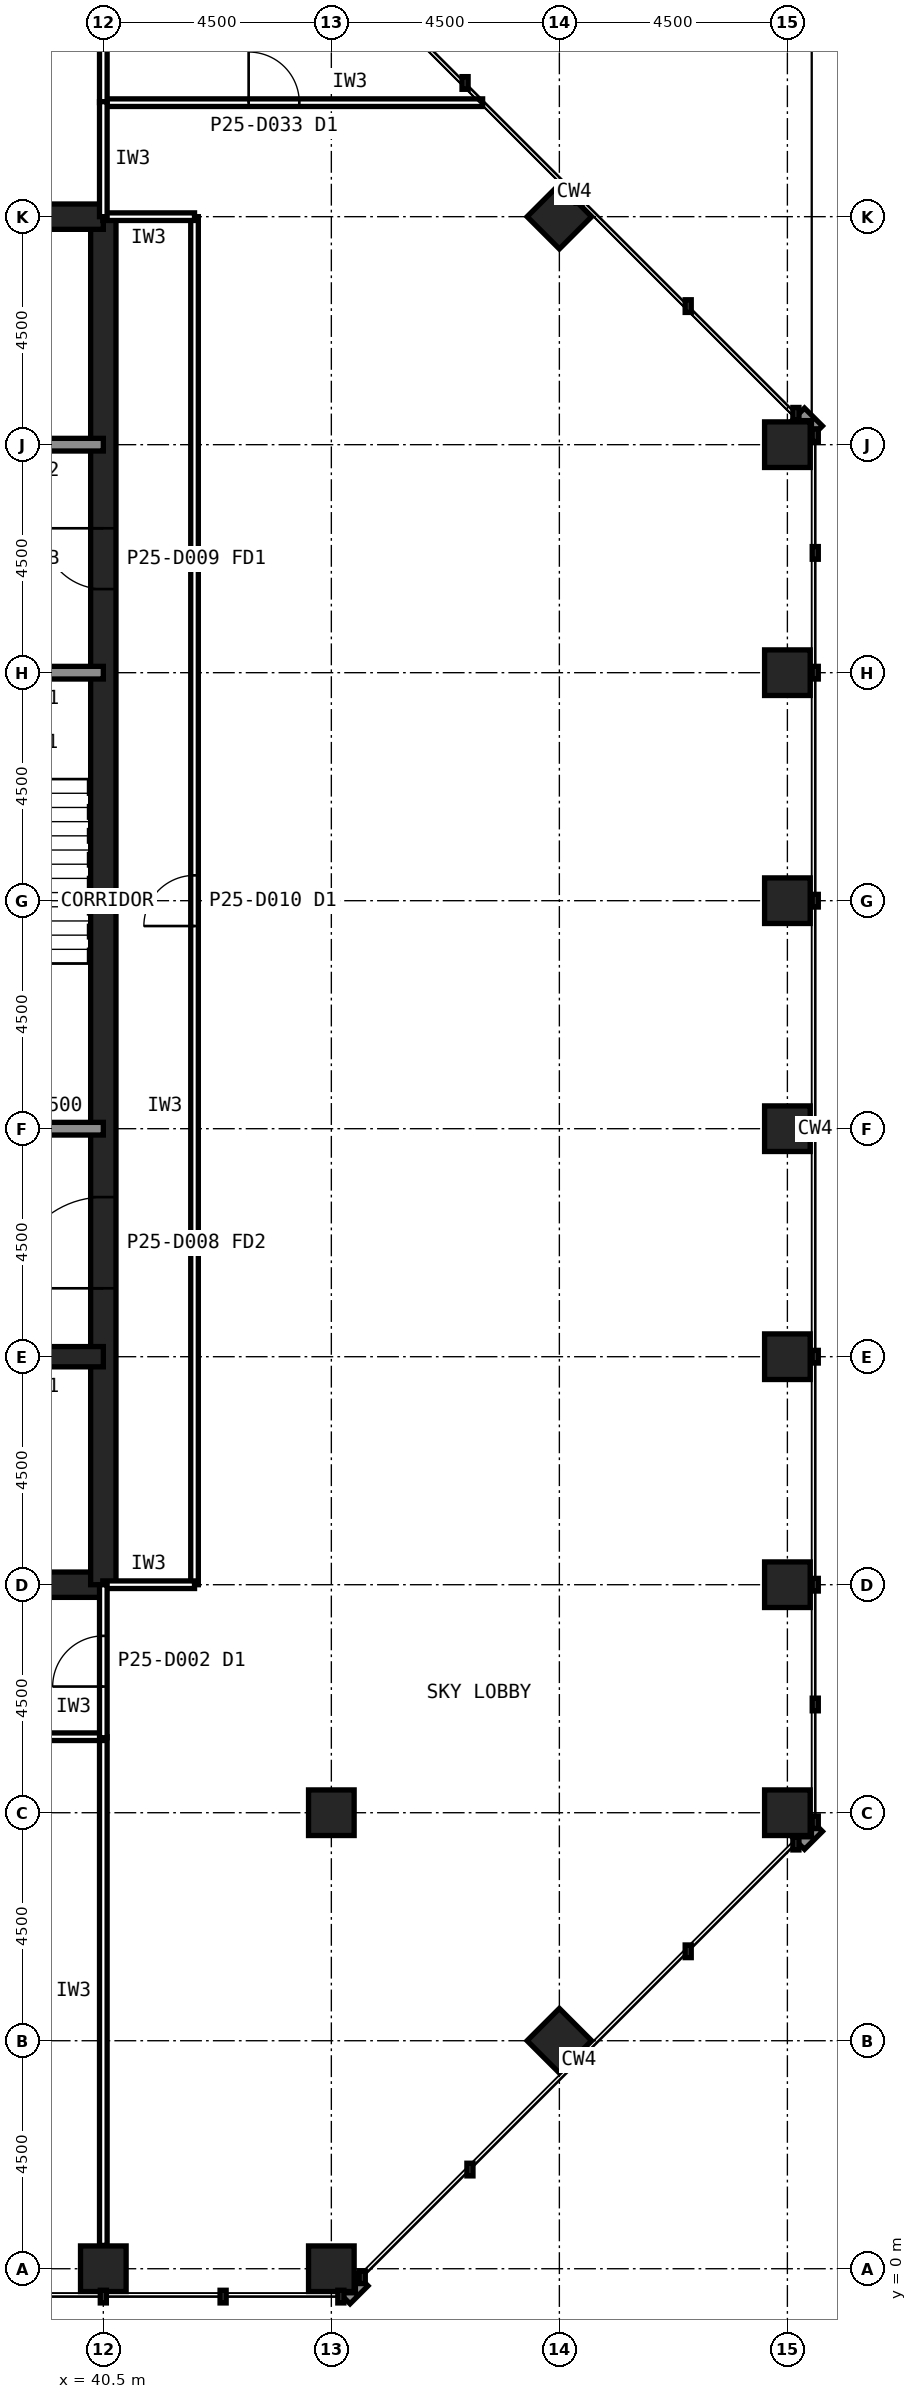
"""IFC4 building model, lengths in metres.
Left out: names, types, materials, properties, quantities, classifications, styles, units other than length and angle.
Written with IfcOpenShell. Run it as: python <this file> out.ifc"""

import sys

from ifc_helpers import new_model, si_unit, direction, frame, frame_2d, origin, origin_2d, place, context, subcontext, project, spatial, rectangle, hollow_rectangle, extrude, element, fill, save


model = new_model("IFC4")
c1 = context("Model", 3, precision=1e-05, world=origin(), true_north=direction((0.0, 1.0)))
c2 = subcontext(c1, "Body", "Model", "MODEL_VIEW")
j1 = project(units=[si_unit("LENGTHUNIT", "METRE"), si_unit("PLANEANGLEUNIT", "RADIAN")], contexts=[c1])
p1 = place(None, origin())
s1 = spatial("IfcSite", under=j1, at=p1, CompositionType="ELEMENT")
p2 = place(p1, origin())
s2 = spatial("IfcBuilding", under=s1, at=p2, CompositionType="ELEMENT")
p3 = place(p2, frame((0.0, 0.0, 110.6)))
s3 = spatial("IfcBuildingStorey", under=s2, at=p3, CompositionType="ELEMENT", Elevation=110.6)
for number, where, z_axis, x_axis in (
    (1, (40.5, 0.0, 0.0), (0.0, 0.0, 1.0), (1.0, 0.0, 0.0)),
    (2, (45.0, 0.0, 0.0), (0.0, 0.0, 1.0), (1.0, 0.0, 0.0)),
    (3, (54.0, 9.0, 0.0), (0.0, 0.0, 1.0), (1.0, 0.0, 0.0)),
    (4, (54.0, 13.5, 0.0), (0.0, 0.0, 1.0), (1.0, 0.0, 0.0)),
    (5, (54.0, 18.0, 0.0), (0.0, 0.0, 1.0), (1.0, 0.0, 0.0)),
    (6, (54.0, 22.5, 0.0), (0.0, 0.0, 1.0), (1.0, 0.0, 0.0)),
    (7, (54.0, 27.0, 0.0), (0.0, 0.0, 1.0), (1.0, 0.0, 0.0)),
    (8, (54.0, 31.5, 0.0), (0.0, 0.0, 1.0), (1.0, 0.0, 0.0)),
    (9, (54.0, 36.0, 0.0), (0.0, 0.0, 1.0), (1.0, 0.0, 0.0)),
    (10, (49.5, 4.5, 0.0), (0.0, 0.0, 1.0), (0.707, 0.707, 0.0)),
    (11, (49.5, 40.5, 0.0), (0.0, 0.0, 1.0), (0.707, 0.707, 0.0)),
    (12, (45.0, 9.0, 0.0), (0.0, 0.0, 1.0), (1.0, 0.0, 0.0)),
):
    element("IfcColumn", number, at=place(p3, frame(where, z_axis=z_axis, x_axis=x_axis)), inside=s3, PredefinedType="COLUMN", context=c2, shape_type="SweptSolid", body=[
        extrude(hollow_rectangle(XDim=0.9, YDim=0.9, WallThickness=0.063, at=origin_2d()), origin(), (0.0, 0.0, 1.0), 5.0),
    ])
p4 = place(p3, frame((13.5, 13.5, 0.0), z_axis=(0.0, 0.0, 1.0), x_axis=(1.0, 0.0, 0.0)))
e13 = element("IfcWall", 13, at=p4, inside=s3, PredefinedType="SHEAR", context=c2, shape_type="SweptSolid", body=[
    extrude(rectangle(XDim=27.0, YDim=0.5, at=frame_2d((13.5, 0.0))), origin(), (0.0, 0.0, 1.0), 5.0),
])
p5 = place(p3, frame((40.5, 13.5, 0.0), z_axis=(0.0, 0.0, 1.0), x_axis=(0.0, 1.0, 0.0)))
e14 = element("IfcWall", 14, at=p5, inside=s3, PredefinedType="SHEAR", context=c2, shape_type="SweptSolid", body=[
    extrude(rectangle(XDim=27.0, YDim=0.5, at=frame_2d((13.5, 0.0))), origin(), (0.0, 0.0, 1.0), 5.0),
])
p6 = place(p5, frame((5.85, 0.0, 0.0)))
e15 = element("IfcOpeningElement", 15, at=p6, cuts=e14, PredefinedType="OPENING", context=c2, shape_type="SweptSolid", body=[
    extrude(rectangle(XDim=1.8, YDim=2.1, at=frame_2d((0.9, 1.05))), frame((0.0, 0.26, 0.0), z_axis=(0.0, -1.0, 0.0), x_axis=(1.0, 0.0, 0.0)), (0.0, 0.0, 1.0), 0.52),
])
p7 = place(p5, frame((19.65, 0.0, 0.0)))
e16 = element("IfcOpeningElement", 16, at=p7, cuts=e14, PredefinedType="OPENING", context=c2, shape_type="SweptSolid", body=[
    extrude(rectangle(XDim=1.2, YDim=2.1, at=frame_2d((0.6, 1.05))), frame((0.0, 0.26, 0.0), z_axis=(0.0, -1.0, 0.0), x_axis=(1.0, 0.0, 0.0)), (0.0, 0.0, 1.0), 0.52),
])
p8 = place(p3, frame((40.5, 40.5, 0.0), z_axis=(0.0, 0.0, 1.0), x_axis=(-1.0, 0.0, 0.0)))
e17 = element("IfcWall", 17, at=p8, inside=s3, PredefinedType="SHEAR", context=c2, shape_type="SweptSolid", body=[
    extrude(rectangle(XDim=27.0, YDim=0.5, at=frame_2d((13.5, 0.0))), origin(), (0.0, 0.0, 1.0), 5.0),
])
p9 = place(p3, frame((13.5, 18.0, 0.0), z_axis=(0.0, 0.0, 1.0), x_axis=(1.0, 0.0, 0.0)))
e18 = element("IfcWall", 18, at=p9, inside=s3, PredefinedType="SHEAR", context=c2, shape_type="SweptSolid", body=[
    extrude(rectangle(XDim=27.0, YDim=0.4, at=frame_2d((13.5, 0.0))), origin(), (0.0, 0.0, 1.0), 5.0),
])
p10 = place(p9, frame((24.3, 0.0, 0.0)))
e19 = element("IfcOpeningElement", 19, at=p10, cuts=e18, PredefinedType="OPENING", context=c2, shape_type="SweptSolid", body=[
    extrude(rectangle(XDim=0.9, YDim=2.1, at=frame_2d((0.45, 1.05))), frame((0.0, 0.21, 0.0), z_axis=(0.0, -1.0, 0.0), x_axis=(1.0, 0.0, 0.0)), (0.0, 0.0, 1.0), 0.42),
])
p11 = place(p9, frame((5.45, 0.0, 0.0)))
e20 = element("IfcOpeningElement", 20, at=p11, cuts=e18, PredefinedType="OPENING", context=c2, shape_type="SweptSolid", body=[
    extrude(rectangle(XDim=1.1, YDim=2.1, at=frame_2d((0.55, 1.05))), frame((0.0, 0.21, 0.0), z_axis=(0.0, -1.0, 0.0), x_axis=(1.0, 0.0, 0.0)), (0.0, 0.0, 1.0), 0.42),
])
p12 = place(p9, frame((8.45, 0.0, 0.0)))
e21 = element("IfcOpeningElement", 21, at=p12, cuts=e18, PredefinedType="OPENING", context=c2, shape_type="SweptSolid", body=[
    extrude(rectangle(XDim=1.1, YDim=2.1, at=frame_2d((0.55, 1.05))), frame((0.0, 0.21, 0.0), z_axis=(0.0, -1.0, 0.0), x_axis=(1.0, 0.0, 0.0)), (0.0, 0.0, 1.0), 0.42),
])
p13 = place(p9, frame((11.45, 0.0, 0.0)))
e22 = element("IfcOpeningElement", 22, at=p13, cuts=e18, PredefinedType="OPENING", context=c2, shape_type="SweptSolid", body=[
    extrude(rectangle(XDim=1.1, YDim=2.1, at=frame_2d((0.55, 1.05))), frame((0.0, 0.21, 0.0), z_axis=(0.0, -1.0, 0.0), x_axis=(1.0, 0.0, 0.0)), (0.0, 0.0, 1.0), 0.42),
])
p14 = place(p9, frame((14.45, 0.0, 0.0)))
e23 = element("IfcOpeningElement", 23, at=p14, cuts=e18, PredefinedType="OPENING", context=c2, shape_type="SweptSolid", body=[
    extrude(rectangle(XDim=1.1, YDim=2.1, at=frame_2d((0.55, 1.05))), frame((0.0, 0.21, 0.0), z_axis=(0.0, -1.0, 0.0), x_axis=(1.0, 0.0, 0.0)), (0.0, 0.0, 1.0), 0.42),
])
p15 = place(p9, frame((17.45, 0.0, 0.0)))
e24 = element("IfcOpeningElement", 24, at=p15, cuts=e18, PredefinedType="OPENING", context=c2, shape_type="SweptSolid", body=[
    extrude(rectangle(XDim=1.1, YDim=2.1, at=frame_2d((0.55, 1.05))), frame((0.0, 0.21, 0.0), z_axis=(0.0, -1.0, 0.0), x_axis=(1.0, 0.0, 0.0)), (0.0, 0.0, 1.0), 0.42),
])
p16 = place(p9, frame((20.45, 0.0, 0.0)))
e25 = element("IfcOpeningElement", 25, at=p16, cuts=e18, PredefinedType="OPENING", context=c2, shape_type="SweptSolid", body=[
    extrude(rectangle(XDim=1.1, YDim=2.1, at=frame_2d((0.55, 1.05))), frame((0.0, 0.21, 0.0), z_axis=(0.0, -1.0, 0.0), x_axis=(1.0, 0.0, 0.0)), (0.0, 0.0, 1.0), 0.42),
])
p17 = place(p9, frame((1.6, 0.0, 0.0)))
e26 = element("IfcOpeningElement", 26, at=p17, cuts=e18, PredefinedType="OPENING", context=c2, shape_type="SweptSolid", body=[
    extrude(rectangle(XDim=1.3, YDim=2.2, at=frame_2d((0.65, 1.1))), frame((0.0, 0.21, 0.0), z_axis=(0.0, -1.0, 0.0), x_axis=(1.0, 0.0, 0.0)), (0.0, 0.0, 1.0), 0.42),
])
p18 = place(p3, frame((13.5, 36.0, 0.0), z_axis=(0.0, 0.0, 1.0), x_axis=(1.0, 0.0, 0.0)))
e27 = element("IfcWall", 27, at=p18, inside=s3, PredefinedType="SOLIDWALL", context=c2, shape_type="SweptSolid", body=[
    extrude(rectangle(XDim=27.0, YDim=0.25, at=frame_2d((13.5, 0.0))), origin(), (0.0, 0.0, 1.0), 4.84),
])
p19 = place(p18, frame((1.8, 0.0, 0.0)))
e28 = element("IfcOpeningElement", 28, at=p19, cuts=e27, PredefinedType="OPENING", context=c2, shape_type="SweptSolid", body=[
    extrude(rectangle(XDim=0.9, YDim=2.1, at=frame_2d((0.45, 1.05))), frame((0.0, 0.135, 0.0), z_axis=(0.0, -1.0, 0.0), x_axis=(1.0, 0.0, 0.0)), (0.0, 0.0, 1.0), 0.27),
])
p20 = place(p18, frame((5.35, 0.0, 0.0)))
e29 = element("IfcOpeningElement", 29, at=p20, cuts=e27, PredefinedType="OPENING", context=c2, shape_type="SweptSolid", body=[
    extrude(rectangle(XDim=1.3, YDim=2.2, at=frame_2d((0.65, 1.1))), frame((0.0, 0.135, 0.0), z_axis=(0.0, -1.0, 0.0), x_axis=(1.0, 0.0, 0.0)), (0.0, 0.0, 1.0), 0.27),
])
p21 = place(p18, frame((8.35, 0.0, 0.0)))
e30 = element("IfcOpeningElement", 30, at=p21, cuts=e27, PredefinedType="OPENING", context=c2, shape_type="SweptSolid", body=[
    extrude(rectangle(XDim=1.3, YDim=2.2, at=frame_2d((0.65, 1.1))), frame((0.0, 0.135, 0.0), z_axis=(0.0, -1.0, 0.0), x_axis=(1.0, 0.0, 0.0)), (0.0, 0.0, 1.0), 0.27),
])
p22 = place(p18, frame((11.35, 0.0, 0.0)))
e31 = element("IfcOpeningElement", 31, at=p22, cuts=e27, PredefinedType="OPENING", context=c2, shape_type="SweptSolid", body=[
    extrude(rectangle(XDim=1.3, YDim=2.2, at=frame_2d((0.65, 1.1))), frame((0.0, 0.135, 0.0), z_axis=(0.0, -1.0, 0.0), x_axis=(1.0, 0.0, 0.0)), (0.0, 0.0, 1.0), 0.27),
])
p23 = place(p18, frame((24.1, 0.0, 0.0)))
e32 = element("IfcOpeningElement", 32, at=p23, cuts=e27, PredefinedType="OPENING", context=c2, shape_type="SweptSolid", body=[
    extrude(rectangle(XDim=1.3, YDim=2.2, at=frame_2d((0.65, 1.1))), frame((0.0, 0.135, 0.0), z_axis=(0.0, -1.0, 0.0), x_axis=(1.0, 0.0, 0.0)), (0.0, 0.0, 1.0), 0.27),
])
p24 = place(p3, frame((13.5, 22.5, 0.0), z_axis=(0.0, 0.0, 1.0), x_axis=(1.0, 0.0, 0.0)))
e33 = element("IfcWall", 33, at=p24, inside=s3, PredefinedType="SOLIDWALL", context=c2, shape_type="SweptSolid", body=[
    extrude(rectangle(XDim=27.0, YDim=0.25, at=frame_2d((13.5, 0.0))), origin(), (0.0, 0.0, 1.0), 4.84),
])
p25 = place(p24, frame((1.65, 0.0, 0.0)))
e34 = element("IfcOpeningElement", 34, at=p25, cuts=e33, PredefinedType="OPENING", context=c2, shape_type="SweptSolid", body=[
    extrude(rectangle(XDim=1.2, YDim=2.1, at=frame_2d((0.6, 1.05))), frame((0.0, 0.135, 0.0), z_axis=(0.0, -1.0, 0.0), x_axis=(1.0, 0.0, 0.0)), (0.0, 0.0, 1.0), 0.27),
])
p26 = place(p24, frame((6.025, 0.0, 0.0)))
e35 = element("IfcOpeningElement", 35, at=p26, cuts=e33, PredefinedType="OPENING", context=c2, shape_type="SweptSolid", body=[
    extrude(rectangle(XDim=1.0, YDim=2.1, at=frame_2d((0.5, 1.05))), frame((0.0, 0.135, 0.0), z_axis=(0.0, -1.0, 0.0), x_axis=(1.0, 0.0, 0.0)), (0.0, 0.0, 1.0), 0.27),
])
p27 = place(p24, frame((10.525, 0.0, 0.0)))
e36 = element("IfcOpeningElement", 36, at=p27, cuts=e33, PredefinedType="OPENING", context=c2, shape_type="SweptSolid", body=[
    extrude(rectangle(XDim=1.0, YDim=2.1, at=frame_2d((0.5, 1.05))), frame((0.0, 0.135, 0.0), z_axis=(0.0, -1.0, 0.0), x_axis=(1.0, 0.0, 0.0)), (0.0, 0.0, 1.0), 0.27),
])
p28 = place(p24, frame((19.75, 0.0, 0.0)))
e37 = element("IfcOpeningElement", 37, at=p28, cuts=e33, PredefinedType="OPENING", context=c2, shape_type="SweptSolid", body=[
    extrude(rectangle(XDim=1.0, YDim=2.1, at=frame_2d((0.5, 1.05))), frame((0.0, 0.135, 0.0), z_axis=(0.0, -1.0, 0.0), x_axis=(1.0, 0.0, 0.0)), (0.0, 0.0, 1.0), 0.27),
])
p29 = place(p24, frame((15.05, 0.0, 0.0)))
e38 = element("IfcOpeningElement", 38, at=p29, cuts=e33, PredefinedType="OPENING", context=c2, shape_type="SweptSolid", body=[
    extrude(rectangle(XDim=1.4, YDim=2.4, at=frame_2d((0.7, 1.2))), frame((0.0, 0.135, 0.0), z_axis=(0.0, -1.0, 0.0), x_axis=(1.0, 0.0, 0.0)), (0.0, 0.0, 1.0), 0.27),
])
p30 = place(p3, frame((13.5, 31.5, 0.0), z_axis=(0.0, 0.0, 1.0), x_axis=(1.0, 0.0, 0.0)))
e39 = element("IfcWall", 39, at=p30, inside=s3, PredefinedType="SOLIDWALL", context=c2, shape_type="SweptSolid", body=[
    extrude(rectangle(XDim=27.0, YDim=0.25, at=frame_2d((13.5, 0.0))), origin(), (0.0, 0.0, 1.0), 4.84),
])
p31 = place(p30, frame((24.15, 0.0, 0.0)))
e40 = element("IfcOpeningElement", 40, at=p31, cuts=e39, PredefinedType="OPENING", context=c2, shape_type="SweptSolid", body=[
    extrude(rectangle(XDim=1.2, YDim=2.1, at=frame_2d((0.6, 1.05))), frame((0.0, 0.135, 0.0), z_axis=(0.0, -1.0, 0.0), x_axis=(1.0, 0.0, 0.0)), (0.0, 0.0, 1.0), 0.27),
])
p32 = place(p30, frame((15.3, 0.0, 0.0)))
e41 = element("IfcOpeningElement", 41, at=p32, cuts=e39, PredefinedType="OPENING", context=c2, shape_type="SweptSolid", body=[
    extrude(rectangle(XDim=0.9, YDim=2.1, at=frame_2d((0.45, 1.05))), frame((0.0, 0.135, 0.0), z_axis=(0.0, -1.0, 0.0), x_axis=(1.0, 0.0, 0.0)), (0.0, 0.0, 1.0), 0.27),
])
p33 = place(p30, frame((19.8, 0.0, 0.0)))
e42 = element("IfcOpeningElement", 42, at=p33, cuts=e39, PredefinedType="OPENING", context=c2, shape_type="SweptSolid", body=[
    extrude(rectangle(XDim=0.9, YDim=2.1, at=frame_2d((0.45, 1.05))), frame((0.0, 0.135, 0.0), z_axis=(0.0, -1.0, 0.0), x_axis=(1.0, 0.0, 0.0)), (0.0, 0.0, 1.0), 0.27),
])
p34 = place(p3, frame((42.3, 13.5, 0.0), z_axis=(0.0, 0.0, 1.0), x_axis=(0.0, 1.0, 0.0)))
e43 = element("IfcWall", 43, at=p34, inside=s3, PredefinedType="PARTITIONING", context=c2, shape_type="SweptSolid", body=[
    extrude(rectangle(XDim=27.0, YDim=0.15, at=frame_2d((13.5, 0.0))), origin(), (0.0, 0.0, 1.0), 4.84),
])
p35 = place(p34, frame((13.0, 0.0, 0.0)))
e44 = element("IfcOpeningElement", 44, at=p35, cuts=e43, PredefinedType="OPENING", context=c2, shape_type="SweptSolid", body=[
    extrude(rectangle(XDim=1.0, YDim=2.1, at=frame_2d((0.5, 1.05))), frame((0.0, 0.085, 0.0), z_axis=(0.0, -1.0, 0.0), x_axis=(1.0, 0.0, 0.0)), (0.0, 0.0, 1.0), 0.17),
])
for number, where, z_axis, x_axis in (
    (45, (40.49, 13.5, 0.0), (0.0, 0.0, 1.0), (1.0, 0.0, 0.0)),
    (46, (42.3, 40.5, 0.0), (0.0, 0.0, 1.0), (-1.0, 0.0, 0.0)),
):
    element("IfcWall", number, at=place(p3, frame(where, z_axis=z_axis, x_axis=x_axis)), inside=s3, PredefinedType="PARTITIONING", context=c2, shape_type="SweptSolid", body=[
        extrude(rectangle(XDim=1.81, YDim=0.15, at=frame_2d((0.905, 0.0))), origin(), (0.0, 0.0, 1.0), 3.989),
    ])
p36 = place(p3, frame((40.5, 0.46, 0.0), z_axis=(0.0, 0.0, 1.0), x_axis=(0.0, 1.0, 0.0)))
e47 = element("IfcWall", 47, at=p36, inside=s3, PredefinedType="PARTITIONING", context=c2, shape_type="SweptSolid", body=[
    extrude(rectangle(XDim=10.04, YDim=0.15, at=frame_2d((5.02, 0.0))), origin(), (0.0, 0.0, 1.0), 3.989),
])
p37 = place(p3, frame((40.5, 10.5, 0.0), z_axis=(0.0, 0.0, 1.0), x_axis=(-1.0, 0.0, 0.0)))
e48 = element("IfcWall", 48, at=p37, inside=s3, PredefinedType="PARTITIONING", context=c2, shape_type="SweptSolid", body=[
    extrude(rectangle(XDim=13.5, YDim=0.15, at=frame_2d((6.75, 0.0))), origin(), (0.0, 0.0, 1.0), 4.84),
])
p38 = place(p37, frame((6.25, 0.0, 0.0)))
e49 = element("IfcOpeningElement", 49, at=p38, cuts=e48, PredefinedType="OPENING", context=c2, shape_type="SweptSolid", body=[
    extrude(rectangle(XDim=1.0, YDim=2.1, at=frame_2d((0.5, 1.05))), frame((0.0, 0.085, 0.0), z_axis=(0.0, -1.0, 0.0), x_axis=(1.0, 0.0, 0.0)), (0.0, 0.0, 1.0), 0.17),
])
p39 = place(p3, frame((40.5, 42.75, 0.0), z_axis=(0.0, 0.0, 1.0), x_axis=(1.0, 0.0, 0.0)))
e50 = element("IfcWall", 50, at=p39, inside=s3, PredefinedType="PARTITIONING", context=c2, shape_type="SweptSolid", body=[
    extrude(rectangle(XDim=7.485, YDim=0.15, at=frame_2d((3.743, 0.0))), origin(), (0.0, 0.0, 1.0), 4.84),
])
p40 = place(p39, frame((2.868, 0.0, 0.0)))
e51 = element("IfcOpeningElement", 51, at=p40, cuts=e50, PredefinedType="OPENING", context=c2, shape_type="SweptSolid", body=[
    extrude(rectangle(XDim=1.0, YDim=2.1, at=frame_2d((0.5, 1.05))), frame((0.0, 0.085, 0.0), z_axis=(0.0, -1.0, 0.0), x_axis=(1.0, 0.0, 0.0)), (0.0, 0.0, 1.0), 0.17),
])
p41 = place(p3, frame((40.5, 49.04, 0.0), z_axis=(0.0, 0.0, 1.0), x_axis=(0.0, -1.0, 0.0)))
e52 = element("IfcWall", 52, at=p41, inside=s3, PredefinedType="PARTITIONING", context=c2, shape_type="SweptSolid", body=[
    extrude(rectangle(XDim=6.29, YDim=0.15, at=frame_2d((3.145, 0.0))), origin(), (0.0, 0.0, 1.0), 3.989),
])
p42 = place(p3, frame((40.5, 42.77, 0.0), z_axis=(0.0, 0.0, 1.0), x_axis=(0.0, -1.0, 0.0)))
e53 = element("IfcWall", 53, at=p42, inside=s3, PredefinedType="PARTITIONING", context=c2, shape_type="SweptSolid", body=[
    extrude(rectangle(XDim=2.27, YDim=0.15, at=frame_2d((1.135, 0.0))), origin(), (0.0, 0.0, 1.0), 3.989),
])
p43 = place(p3, frame((40.5, 10.48, 0.0), z_axis=(0.0, 0.0, 1.0), x_axis=(0.0, 1.0, 0.0)))
e54 = element("IfcWall", 54, at=p43, inside=s3, PredefinedType="PARTITIONING", context=c2, shape_type="SweptSolid", body=[
    extrude(rectangle(XDim=3.02, YDim=0.15, at=frame_2d((1.51, 0.0))), origin(), (0.0, 0.0, 1.0), 3.989),
])
p44 = place(p43, frame((1.01, 0.0, 0.0)))
e55 = element("IfcOpeningElement", 55, at=p44, cuts=e54, PredefinedType="OPENING", context=c2, shape_type="SweptSolid", body=[
    extrude(rectangle(XDim=1.0, YDim=2.1, at=frame_2d((0.5, 1.05))), frame((0.0, 0.085, 0.0), z_axis=(0.0, -1.0, 0.0), x_axis=(1.0, 0.0, 0.0)), (0.0, 0.0, 1.0), 0.17),
])
p45 = place(p6, origin())
e56 = element("IfcDoor", 56, at=p45, inside=s3, OperationType="SINGLE_SWING_LEFT", PredefinedType="DOOR", context=c2, shape_type="SweptSolid", body=[
    extrude(rectangle(XDim=1.8, YDim=2.1, at=frame_2d((0.9, 1.05))), frame((0.0, 0.025, 0.0), z_axis=(0.0, -1.0, 0.0), x_axis=(1.0, 0.0, 0.0)), (0.0, 0.0, 1.0), 0.05),
])
fill(e15, e56)
p46 = place(p7, origin())
e57 = element("IfcDoor", 57, at=p46, inside=s3, OperationType="SINGLE_SWING_RIGHT", PredefinedType="DOOR", context=c2, shape_type="SweptSolid", body=[
    extrude(rectangle(XDim=1.2, YDim=2.1, at=frame_2d((0.6, 1.05))), frame((0.0, 0.025, 0.0), z_axis=(0.0, -1.0, 0.0), x_axis=(1.0, 0.0, 0.0)), (0.0, 0.0, 1.0), 0.05),
])
fill(e16, e57)
p47 = place(p35, origin())
e58 = element("IfcDoor", 58, at=p47, inside=s3, OperationType="SINGLE_SWING_LEFT", PredefinedType="DOOR", context=c2, shape_type="SweptSolid", body=[
    extrude(rectangle(XDim=1.0, YDim=2.1, at=frame_2d((0.5, 1.05))), frame((0.0, 0.025, 0.0), z_axis=(0.0, -1.0, 0.0), x_axis=(1.0, 0.0, 0.0)), (0.0, 0.0, 1.0), 0.05),
])
fill(e44, e58)
p48 = place(p40, origin())
e59 = element("IfcDoor", 59, at=p48, inside=s3, OperationType="SINGLE_SWING_LEFT", PredefinedType="DOOR", context=c2, shape_type="SweptSolid", body=[
    extrude(rectangle(XDim=1.0, YDim=2.1, at=frame_2d((0.5, 1.05))), frame((0.0, 0.025, 0.0), z_axis=(0.0, -1.0, 0.0), x_axis=(1.0, 0.0, 0.0)), (0.0, 0.0, 1.0), 0.05),
])
fill(e51, e59)
p49 = place(p44, origin())
e60 = element("IfcDoor", 60, at=p49, inside=s3, OperationType="SINGLE_SWING_LEFT", PredefinedType="DOOR", context=c2, shape_type="SweptSolid", body=[
    extrude(rectangle(XDim=1.0, YDim=2.1, at=frame_2d((0.5, 1.05))), frame((0.0, 0.025, 0.0), z_axis=(0.0, -1.0, 0.0), x_axis=(1.0, 0.0, 0.0)), (0.0, 0.0, 1.0), 0.05),
])
fill(e55, e60)
save(model, sys.argv[1])
